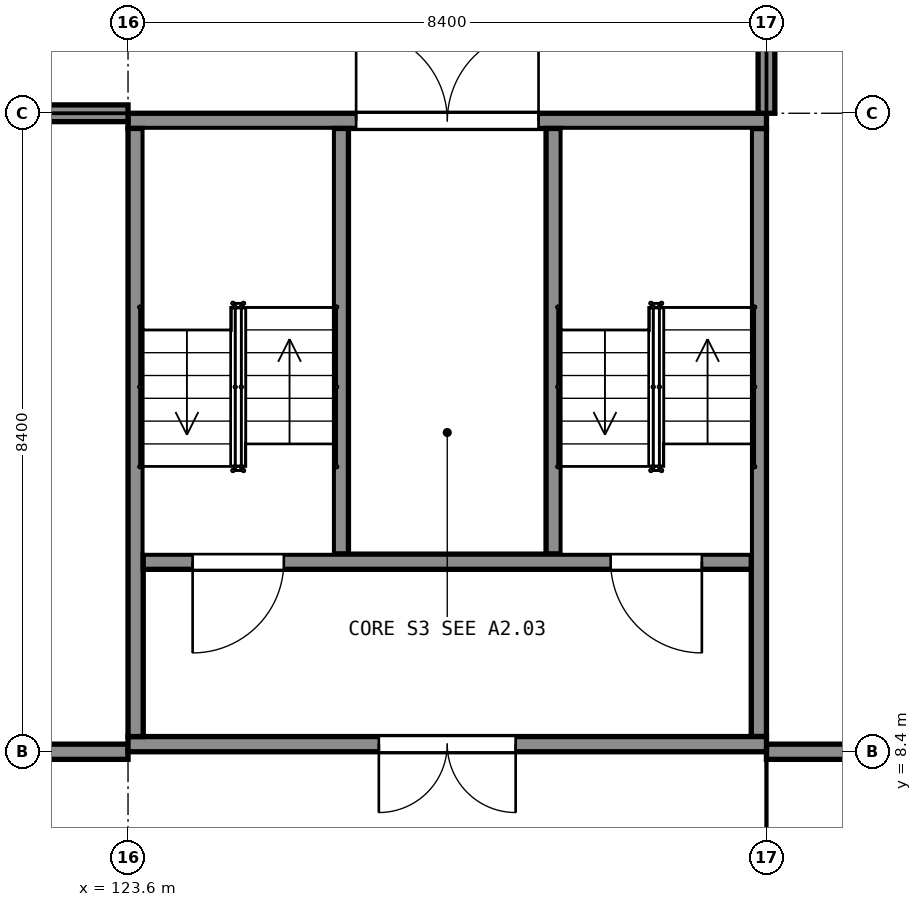
"""IFC4 building model, lengths in metres.
Left out: names, types, materials, properties, quantities, classifications, styles, units other than length and angle.
Written with IfcOpenShell. Run it as: python <this file> out.ifc"""

import sys

from ifc_helpers import new_model, si_unit, direction, frame, frame_2d, origin, place, context, subcontext, project, spatial, rectangle, extrude, element, fill, save


model = new_model("IFC4")
c1 = context("Model", 3, precision=1e-05, world=origin(), true_north=direction((0.0, 1.0)))
c2 = subcontext(c1, "Body", "Model", "MODEL_VIEW")
j1 = project(units=[si_unit("LENGTHUNIT", "METRE"), si_unit("PLANEANGLEUNIT", "RADIAN")], contexts=[c1])
p1 = place(None, origin())
s1 = spatial("IfcSite", under=j1, at=p1, CompositionType="ELEMENT")
p2 = place(p1, origin())
s2 = spatial("IfcBuilding", under=s1, at=p2, CompositionType="ELEMENT")
p3 = place(p2, origin())
s3 = spatial("IfcBuildingStorey", under=s2, at=p3, CompositionType="ELEMENT", Elevation=0.0)
p4 = place(p3, frame((123.6, 8.5, -1.8), z_axis=(0.0, 0.0, 1.0), x_axis=(1.0, 0.0, 0.0)))
e1 = element("IfcWall", 1, at=p4, inside=s3, PredefinedType="SHEAR", context=c2, shape_type="SweptSolid", body=[
    extrude(rectangle(XDim=8.4, YDim=0.2, at=frame_2d((4.2, 0.0))), origin(), (0.0, 0.0, 1.0), 7.3),
])
p5 = place(p4, frame((3.3, 0.0, 1.8)))
e2 = element("IfcOpeningElement", 2, at=p5, cuts=e1, PredefinedType="OPENING", context=c2, shape_type="SweptSolid", body=[
    extrude(rectangle(XDim=1.8, YDim=2.1, at=frame_2d((0.9, 1.05))), frame((0.0, 0.11, 0.0), z_axis=(0.0, -1.0, 0.0), x_axis=(1.0, 0.0, 0.0)), (0.0, 0.0, 1.0), 0.22),
])
p6 = place(p3, frame((123.6, 16.7, -1.8), z_axis=(0.0, 0.0, 1.0), x_axis=(1.0, 0.0, 0.0)))
e3 = element("IfcWall", 3, at=p6, inside=s3, PredefinedType="SHEAR", context=c2, shape_type="SweptSolid", body=[
    extrude(rectangle(XDim=8.4, YDim=0.2, at=frame_2d((4.2, 0.0))), origin(), (0.0, 0.0, 1.0), 7.3),
])
p7 = place(p6, frame((3.001, 0.0, 1.8)))
e4 = element("IfcOpeningElement", 4, at=p7, cuts=e3, PredefinedType="OPENING", context=c2, shape_type="SweptSolid", body=[
    extrude(rectangle(XDim=2.4, YDim=2.1, at=frame_2d((1.2, 1.05))), frame((0.0, 0.11, 0.0), z_axis=(0.0, -1.0, 0.0), x_axis=(1.0, 0.0, 0.0)), (0.0, 0.0, 1.0), 0.22),
])
for number, where, z_axis, x_axis in (
    (5, (123.7, 8.6, -1.8), (0.0, 0.0, 1.0), (0.0, 1.0, 0.0)),
    (6, (131.9, 8.6, -1.8), (0.0, 0.0, 1.0), (0.0, 1.0, 0.0)),
):
    element("IfcWall", number, at=place(p3, frame(where, z_axis=z_axis, x_axis=x_axis)), inside=s3, PredefinedType="SHEAR", context=c2, shape_type="SweptSolid", body=[
        extrude(rectangle(XDim=8.0, YDim=0.2, at=frame_2d((4.0, 0.0))), origin(), (0.0, 0.0, 1.0), 7.3),
    ])
p8 = place(p3, frame((123.8, 10.9, -1.8), z_axis=(0.0, 0.0, 1.0), x_axis=(1.0, 0.0, 0.0)))
e7 = element("IfcWall", 7, at=p8, inside=s3, PredefinedType="SHEAR", context=c2, shape_type="SweptSolid", body=[
    extrude(rectangle(XDim=8.0, YDim=0.2, at=frame_2d((4.0, 0.0))), origin(), (0.0, 0.0, 1.0), 7.3),
])
p9 = place(p8, frame((0.65, 0.0, 1.8)))
e8 = element("IfcOpeningElement", 8, at=p9, cuts=e7, PredefinedType="OPENING", context=c2, shape_type="SweptSolid", body=[
    extrude(rectangle(XDim=1.2, YDim=2.1, at=frame_2d((0.6, 1.05))), frame((0.0, 0.11, 0.0), z_axis=(0.0, -1.0, 0.0), x_axis=(1.0, 0.0, 0.0)), (0.0, 0.0, 1.0), 0.22),
])
p10 = place(p8, frame((6.15, 0.0, 1.8)))
e9 = element("IfcOpeningElement", 9, at=p10, cuts=e7, PredefinedType="OPENING", context=c2, shape_type="SweptSolid", body=[
    extrude(rectangle(XDim=1.2, YDim=2.1, at=frame_2d((0.6, 1.05))), frame((0.0, 0.11, 0.0), z_axis=(0.0, -1.0, 0.0), x_axis=(1.0, 0.0, 0.0)), (0.0, 0.0, 1.0), 0.22),
])
for number, where, z_axis, x_axis in (
    (10, (126.4, 11.0, -1.8), (0.0, 0.0, 1.0), (0.0, 1.0, 0.0)),
    (11, (129.2, 11.0, -1.8), (0.0, 0.0, 1.0), (0.0, 1.0, 0.0)),
):
    element("IfcWall", number, at=place(p3, frame(where, z_axis=z_axis, x_axis=x_axis)), inside=s3, PredefinedType="SHEAR", context=c2, shape_type="SweptSolid", body=[
        extrude(rectangle(XDim=5.6, YDim=0.2, at=frame_2d((2.8, 0.0))), origin(), (0.0, 0.0, 1.0), 7.3),
    ])
p11 = place(p3, frame((132.0, 16.8, 0.0), z_axis=(0.0, 0.0, 1.0), x_axis=(0.0, 1.0, 0.0)))
e12 = element("IfcWall", 12, at=p11, inside=s3, PredefinedType="SOLIDWALL", context=c2, shape_type="SweptSolid", body=[
    extrude(rectangle(XDim=8.0, YDim=0.22, at=frame_2d((4.0, 0.0))), origin(), (0.0, 0.0, 1.0), 4.44),
])
p12 = place(p11, frame((3.4, 0.0, 2.1)))
e13 = element("IfcOpeningElement", 13, at=p12, cuts=e12, PredefinedType="OPENING", context=c2, shape_type="SweptSolid", body=[
    extrude(rectangle(XDim=1.2, YDim=0.6, at=frame_2d((0.6, 0.3))), frame((0.0, 0.12, 0.0), z_axis=(0.0, -1.0, 0.0), x_axis=(1.0, 0.0, 0.0)), (0.0, 0.0, 1.0), 0.24),
])
p13 = place(p3, frame((115.6, 16.8, 0.0), z_axis=(0.0, 0.0, 1.0), x_axis=(1.0, 0.0, 0.0)))
e14 = element("IfcWall", 14, at=p13, inside=s3, PredefinedType="SOLIDWALL", context=c2, shape_type="SweptSolid", body=[
    extrude(rectangle(XDim=8.0, YDim=0.22, at=frame_2d((4.0, 0.0))), origin(), (0.0, 0.0, 1.0), 4.44),
])
p14 = place(p13, frame((3.4, 0.0, 2.1)))
e15 = element("IfcOpeningElement", 15, at=p14, cuts=e14, PredefinedType="OPENING", context=c2, shape_type="SweptSolid", body=[
    extrude(rectangle(XDim=1.2, YDim=0.6, at=frame_2d((0.6, 0.3))), frame((0.0, 0.12, 0.0), z_axis=(0.0, -1.0, 0.0), x_axis=(1.0, 0.0, 0.0)), (0.0, 0.0, 1.0), 0.24),
])
for number, where, z_axis, x_axis in (
    (16, (132.0, 8.4, 0.0), (0.0, 0.0, 1.0), (1.0, 0.0, 0.0)),
    (17, (115.6, 8.4, 0.0), (0.0, 0.0, 1.0), (1.0, 0.0, 0.0)),
):
    element("IfcWall", number, at=place(p3, frame(where, z_axis=z_axis, x_axis=x_axis)), inside=s3, PredefinedType="PARTITIONING", context=c2, shape_type="SweptSolid", body=[
        extrude(rectangle(XDim=8.0, YDim=0.2, at=frame_2d((4.0, 0.0))), origin(), (0.0, 0.0, 1.0), 4.4),
    ])
p15 = place(p7, origin())
e18 = element("IfcDoor", 18, at=p15, inside=s3, OperationType="DOUBLE_DOOR_SINGLE_SWING", PredefinedType="DOOR", context=c2, shape_type="SweptSolid", body=[
    extrude(rectangle(XDim=2.4, YDim=2.1, at=frame_2d((1.2, 1.05))), frame((0.0, 0.025, 0.0), z_axis=(0.0, -1.0, 0.0), x_axis=(1.0, 0.0, 0.0)), (0.0, 0.0, 1.0), 0.05),
])
fill(e4, e18)
p16 = place(p5, origin())
e19 = element("IfcDoor", 19, at=p16, inside=s3, OperationType="DOUBLE_DOOR_SINGLE_SWING", PredefinedType="DOOR", context=c2, shape_type="SweptSolid", body=[
    extrude(rectangle(XDim=1.8, YDim=2.1, at=frame_2d((0.9, 1.05))), frame((0.0, 0.025, 0.0), z_axis=(0.0, -1.0, 0.0), x_axis=(1.0, 0.0, 0.0)), (0.0, 0.0, 1.0), 0.05),
])
fill(e2, e19)
p17 = place(p9, origin())
e20 = element("IfcDoor", 20, at=p17, inside=s3, OperationType="SINGLE_SWING_LEFT", PredefinedType="DOOR", context=c2, shape_type="SweptSolid", body=[
    extrude(rectangle(XDim=1.2, YDim=2.1, at=frame_2d((0.6, 1.05))), frame((0.0, 0.025, 0.0), z_axis=(0.0, -1.0, 0.0), x_axis=(1.0, 0.0, 0.0)), (0.0, 0.0, 1.0), 0.05),
])
fill(e8, e20)
p18 = place(p10, origin())
e21 = element("IfcDoor", 21, at=p18, inside=s3, OperationType="SINGLE_SWING_RIGHT", PredefinedType="DOOR", context=c2, shape_type="SweptSolid", body=[
    extrude(rectangle(XDim=1.2, YDim=2.1, at=frame_2d((0.6, 1.05))), frame((0.0, 0.025, 0.0), z_axis=(0.0, -1.0, 0.0), x_axis=(1.0, 0.0, 0.0)), (0.0, 0.0, 1.0), 0.05),
])
fill(e9, e21)
save(model, sys.argv[1])
